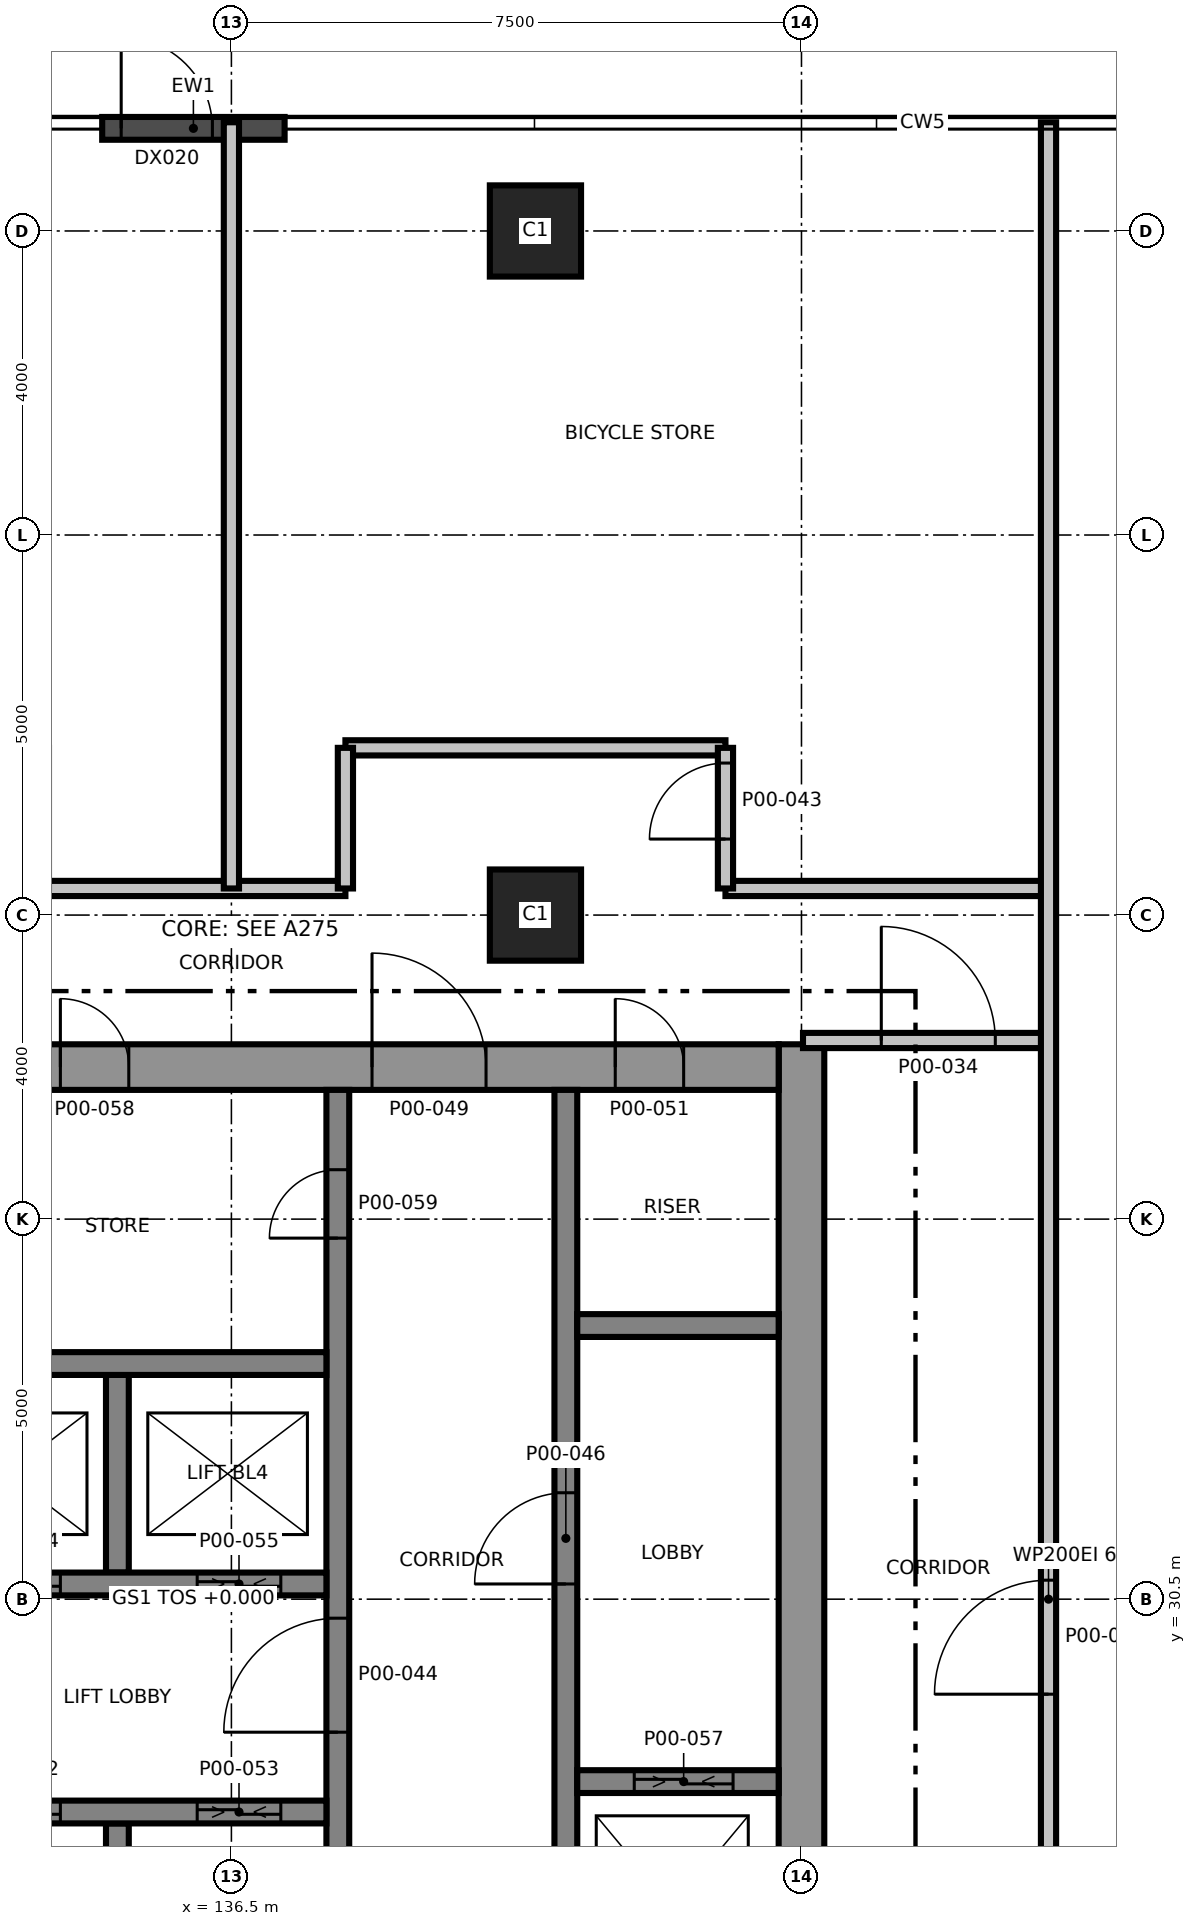
"""IFC4 building model, lengths in metres.
Left out: names, types, materials, properties, quantities, classifications, styles, units other than length and angle.
Written with IfcOpenShell. Run it as: python <this file> out.ifc"""

import sys

from ifc_helpers import new_model, si_unit, direction, frame, frame_2d, origin, origin_2d, place, context, subcontext, project, spatial, rectangle, extrude, element, fill, save


model = new_model("IFC4")
c1 = context("Model", 3, precision=1e-05, world=origin(), true_north=direction((0.0, 1.0)))
c2 = subcontext(c1, "Body", "Model", "MODEL_VIEW")
j1 = project(units=[si_unit("LENGTHUNIT", "METRE"), si_unit("PLANEANGLEUNIT", "RADIAN")], contexts=[c1])
p1 = place(None, origin())
s1 = spatial("IfcSite", under=j1, at=p1, CompositionType="ELEMENT")
p2 = place(p1, origin())
s2 = spatial("IfcBuilding", under=s1, at=p2, CompositionType="ELEMENT")
p3 = place(p2, origin())
s3 = spatial("IfcBuildingStorey", under=s2, at=p3, CompositionType="ELEMENT", Elevation=0.0)
p4 = place(p3, frame((144.0, 24.2, 0.0), z_axis=(0.0, 0.0, 1.0), x_axis=(0.0, 1.0, 0.0)))
e1 = element("IfcWall", 1, at=p4, inside=s3, PredefinedType="SHEAR", context=c2, shape_type="SweptSolid", body=[
    extrude(rectangle(XDim=13.6, YDim=0.6, at=frame_2d((6.8, 0.0))), origin(), (0.0, 0.0, 1.0), 8.0),
])
p5 = place(p3, frame((128.7, 37.5, 0.0), z_axis=(0.0, 0.0, 1.0), x_axis=(1.0, 0.0, 0.0)))
e2 = element("IfcWall", 2, at=p5, inside=s3, PredefinedType="SHEAR", context=c2, shape_type="SweptSolid", body=[
    extrude(rectangle(XDim=15.0, YDim=0.6, at=frame_2d((7.5, 0.0))), origin(), (0.0, 0.0, 1.0), 8.0),
])
p6 = place(p5, frame((9.65, 0.0, 0.0)))
e3 = element("IfcOpeningElement", 3, at=p6, cuts=e2, PredefinedType="OPENING", context=c2, shape_type="SweptSolid", body=[
    extrude(rectangle(XDim=1.5, YDim=2.1, at=frame_2d((0.75, 1.05))), frame((0.0, 0.31, 0.0), z_axis=(0.0, -1.0, 0.0), x_axis=(1.0, 0.0, 0.0)), (0.0, 0.0, 1.0), 0.62),
])
p7 = place(p5, frame((12.85, 0.0, 0.0)))
e4 = element("IfcOpeningElement", 4, at=p7, cuts=e2, PredefinedType="OPENING", context=c2, shape_type="SweptSolid", body=[
    extrude(rectangle(XDim=0.9, YDim=2.1, at=frame_2d((0.45, 1.05))), frame((0.0, 0.31, 0.0), z_axis=(0.0, -1.0, 0.0), x_axis=(1.0, 0.0, 0.0)), (0.0, 0.0, 1.0), 0.62),
])
p8 = place(p5, frame((5.55, 0.0, 0.0)))
e5 = element("IfcOpeningElement", 5, at=p8, cuts=e2, PredefinedType="OPENING", context=c2, shape_type="SweptSolid", body=[
    extrude(rectangle(XDim=0.9, YDim=2.1, at=frame_2d((0.45, 1.05))), frame((0.0, 0.31, 0.0), z_axis=(0.0, -1.0, 0.0), x_axis=(1.0, 0.0, 0.0)), (0.0, 0.0, 1.0), 0.62),
])
p9 = place(p3, frame((137.9, 24.8, 0.0), z_axis=(0.0, 0.0, 1.0), x_axis=(0.0, 1.0, 0.0)))
e6 = element("IfcWall", 6, at=p9, inside=s3, PredefinedType="SHEAR", context=c2, shape_type="SweptSolid", body=[
    extrude(rectangle(XDim=12.4, YDim=0.3, at=frame_2d((6.2, 0.0))), origin(), (0.0, 0.0, 1.0), 8.0),
])
p10 = place(p9, frame((3.95, 0.0, 0.0)))
e7 = element("IfcOpeningElement", 7, at=p10, cuts=e6, PredefinedType="OPENING", context=c2, shape_type="SweptSolid", body=[
    extrude(rectangle(XDim=1.5, YDim=2.1, at=frame_2d((0.75, 1.05))), frame((0.0, 0.16, 0.0), z_axis=(0.0, -1.0, 0.0), x_axis=(1.0, 0.0, 0.0)), (0.0, 0.0, 1.0), 0.32),
])
p11 = place(p9, frame((10.45, 0.0, 0.0)))
e8 = element("IfcOpeningElement", 8, at=p11, cuts=e6, PredefinedType="OPENING", context=c2, shape_type="SweptSolid", body=[
    extrude(rectangle(XDim=0.9, YDim=2.1, at=frame_2d((0.45, 1.05))), frame((0.0, 0.16, 0.0), z_axis=(0.0, -1.0, 0.0), x_axis=(1.0, 0.0, 0.0)), (0.0, 0.0, 1.0), 0.32),
])
p12 = place(p3, frame((140.9, 24.8, 0.0), z_axis=(0.0, 0.0, 1.0), x_axis=(0.0, 1.0, 0.0)))
e9 = element("IfcWall", 9, at=p12, inside=s3, PredefinedType="SHEAR", context=c2, shape_type="SweptSolid", body=[
    extrude(rectangle(XDim=12.4, YDim=0.3, at=frame_2d((6.2, 0.0))), origin(), (0.0, 0.0, 1.0), 8.0),
])
p13 = place(p12, frame((5.9, 0.0, 0.0)))
e10 = element("IfcOpeningElement", 10, at=p13, cuts=e9, PredefinedType="OPENING", context=c2, shape_type="SweptSolid", body=[
    extrude(rectangle(XDim=1.2, YDim=2.1, at=frame_2d((0.6, 1.05))), frame((0.0, 0.16, 0.0), z_axis=(0.0, -1.0, 0.0), x_axis=(1.0, 0.0, 0.0)), (0.0, 0.0, 1.0), 0.32),
])
p14 = place(p3, frame((135.0, 24.8, 0.0), z_axis=(0.0, 0.0, 1.0), x_axis=(0.0, 1.0, 0.0)))
e11 = element("IfcWall", 11, at=p14, inside=s3, PredefinedType="SHEAR", context=c2, shape_type="SweptSolid", body=[
    extrude(rectangle(XDim=2.75, YDim=0.3, at=frame_2d((1.375, 0.0))), origin(), (0.0, 0.0, 1.0), 8.0),
])
p15 = place(p3, frame((135.0, 30.85, 0.0), z_axis=(0.0, 0.0, 1.0), x_axis=(0.0, 1.0, 0.0)))
e12 = element("IfcWall", 12, at=p15, inside=s3, PredefinedType="SHEAR", context=c2, shape_type="SweptSolid", body=[
    extrude(rectangle(XDim=2.6, YDim=0.3, at=frame_2d((1.3, 0.0))), origin(), (0.0, 0.0, 1.0), 8.0),
])
p16 = place(p3, frame((132.25, 27.7, 0.0), z_axis=(0.0, 0.0, 1.0), x_axis=(1.0, 0.0, 0.0)))
e13 = element("IfcWall", 13, at=p16, inside=s3, PredefinedType="SHEAR", context=c2, shape_type="SweptSolid", body=[
    extrude(rectangle(XDim=5.5, YDim=0.3, at=frame_2d((2.75, 0.0))), origin(), (0.0, 0.0, 1.0), 8.0),
])
p17 = place(p16, frame((0.9, 0.0, 0.0)))
e14 = element("IfcOpeningElement", 14, at=p17, cuts=e13, PredefinedType="OPENING", context=c2, shape_type="SweptSolid", body=[
    extrude(rectangle(XDim=1.1, YDim=2.4, at=frame_2d((0.55, 1.2))), frame((0.0, 0.16, 0.0), z_axis=(0.0, -1.0, 0.0), x_axis=(1.0, 0.0, 0.0)), (0.0, 0.0, 1.0), 0.32),
])
p18 = place(p16, frame((3.8, 0.0, 0.0)))
e15 = element("IfcOpeningElement", 15, at=p18, cuts=e13, PredefinedType="OPENING", context=c2, shape_type="SweptSolid", body=[
    extrude(rectangle(XDim=1.1, YDim=2.4, at=frame_2d((0.55, 1.2))), frame((0.0, 0.16, 0.0), z_axis=(0.0, -1.0, 0.0), x_axis=(1.0, 0.0, 0.0)), (0.0, 0.0, 1.0), 0.32),
])
p19 = place(p3, frame((132.25, 30.7, 0.0), z_axis=(0.0, 0.0, 1.0), x_axis=(1.0, 0.0, 0.0)))
e16 = element("IfcWall", 16, at=p19, inside=s3, PredefinedType="SHEAR", context=c2, shape_type="SweptSolid", body=[
    extrude(rectangle(XDim=5.5, YDim=0.3, at=frame_2d((2.75, 0.0))), origin(), (0.0, 0.0, 1.0), 8.0),
])
p20 = place(p19, frame((0.9, 0.0, 0.0)))
e17 = element("IfcOpeningElement", 17, at=p20, cuts=e16, PredefinedType="OPENING", context=c2, shape_type="SweptSolid", body=[
    extrude(rectangle(XDim=1.1, YDim=2.4, at=frame_2d((0.55, 1.2))), frame((0.0, 0.16, 0.0), z_axis=(0.0, -1.0, 0.0), x_axis=(1.0, 0.0, 0.0)), (0.0, 0.0, 1.0), 0.32),
])
p21 = place(p19, frame((3.8, 0.0, 0.0)))
e18 = element("IfcOpeningElement", 18, at=p21, cuts=e16, PredefinedType="OPENING", context=c2, shape_type="SweptSolid", body=[
    extrude(rectangle(XDim=1.1, YDim=2.4, at=frame_2d((0.55, 1.2))), frame((0.0, 0.16, 0.0), z_axis=(0.0, -1.0, 0.0), x_axis=(1.0, 0.0, 0.0)), (0.0, 0.0, 1.0), 0.32),
])
p22 = place(p3, frame((132.25, 33.6, 0.0), z_axis=(0.0, 0.0, 1.0), x_axis=(1.0, 0.0, 0.0)))
e19 = element("IfcWall", 19, at=p22, inside=s3, PredefinedType="SHEAR", context=c2, shape_type="SweptSolid", body=[
    extrude(rectangle(XDim=5.5, YDim=0.3, at=frame_2d((2.75, 0.0))), origin(), (0.0, 0.0, 1.0), 8.0),
])
p23 = place(p3, frame((141.05, 28.1, 0.0), z_axis=(0.0, 0.0, 1.0), x_axis=(1.0, 0.0, 0.0)))
e20 = element("IfcWall", 20, at=p23, inside=s3, PredefinedType="SHEAR", context=c2, shape_type="SweptSolid", body=[
    extrude(rectangle(XDim=2.65, YDim=0.3, at=frame_2d((1.325, 0.0))), origin(), (0.0, 0.0, 1.0), 8.0),
])
p24 = place(p23, frame((0.75, 0.0, 0.0)))
e21 = element("IfcOpeningElement", 21, at=p24, cuts=e20, PredefinedType="OPENING", context=c2, shape_type="SweptSolid", body=[
    extrude(rectangle(XDim=1.3, YDim=2.4, at=frame_2d((0.65, 1.2))), frame((0.0, 0.16, 0.0), z_axis=(0.0, -1.0, 0.0), x_axis=(1.0, 0.0, 0.0)), (0.0, 0.0, 1.0), 0.32),
])
p25 = place(p3, frame((141.05, 34.1, 0.0), z_axis=(0.0, 0.0, 1.0), x_axis=(1.0, 0.0, 0.0)))
e22 = element("IfcWall", 22, at=p25, inside=s3, PredefinedType="SHEAR", context=c2, shape_type="SweptSolid", body=[
    extrude(rectangle(XDim=2.65, YDim=0.3, at=frame_2d((1.325, 0.0))), origin(), (0.0, 0.0, 1.0), 8.0),
])
for number, where, z_axis, x_axis in (
    (23, (140.5, 39.5, 0.0), (0.0, 0.0, 1.0), (1.0, 0.0, 0.0)),
    (24, (140.5, 48.5, 0.0), (0.0, 0.0, 1.0), (1.0, 0.0, 0.0)),
):
    element("IfcColumn", number, at=place(p3, frame(where, z_axis=z_axis, x_axis=x_axis)), inside=s3, PredefinedType="COLUMN", context=c2, shape_type="SweptSolid", body=[
        extrude(rectangle(XDim=1.2, YDim=1.2, at=origin_2d()), origin(), (0.0, 0.0, 1.0), 8.0),
    ])
p26 = place(p3, frame((134.8, 49.85, 0.0), z_axis=(0.0, 0.0, 1.0), x_axis=(1.0, 0.0, 0.0)))
e25 = element("IfcWall", 25, at=p26, inside=s3, PredefinedType="SOLIDWALL", context=c2, shape_type="SweptSolid", body=[
    extrude(rectangle(XDim=2.4, YDim=0.3, at=frame_2d((1.2, 0.0))), origin(), (0.0, 0.0, 1.0), 7.7),
])
p27 = place(p26, frame((0.25, 0.0, 0.0)))
e26 = element("IfcOpeningElement", 26, at=p27, cuts=e25, PredefinedType="OPENING", context=c2, shape_type="SweptSolid", body=[
    extrude(rectangle(XDim=1.2, YDim=2.4, at=frame_2d((0.6, 1.2))), frame((0.0, 0.16, 0.0), z_axis=(0.0, -1.0, 0.0), x_axis=(1.0, 0.0, 0.0)), (0.0, 0.0, 1.0), 0.32),
])
p28 = place(p3, frame((144.02, 37.85, 0.0), z_axis=(0.0, 0.0, 1.0), x_axis=(1.0, 0.0, 0.0)))
e27 = element("IfcWall", 27, at=p28, inside=s3, PredefinedType="PARTITIONING", context=c2, shape_type="SweptSolid", body=[
    extrude(rectangle(XDim=3.23, YDim=0.2, at=frame_2d((1.615, 0.0))), origin(), (0.0, 0.0, 1.0), 7.7),
])
p29 = place(p28, frame((1.03, 0.0, 0.0)))
e28 = element("IfcOpeningElement", 28, at=p29, cuts=e27, PredefinedType="OPENING", context=c2, shape_type="SweptSolid", body=[
    extrude(rectangle(XDim=1.5, YDim=2.1, at=frame_2d((0.75, 1.05))), frame((0.0, 0.11, 0.0), z_axis=(0.0, -1.0, 0.0), x_axis=(1.0, 0.0, 0.0)), (0.0, 0.0, 1.0), 0.22),
])
p30 = place(p3, frame((134.0, 39.85, 0.0), z_axis=(0.0, 0.0, 1.0), x_axis=(1.0, 0.0, 0.0)))
e29 = element("IfcWall", 29, at=p30, inside=s3, PredefinedType="PARTITIONING", context=c2, shape_type="SweptSolid", body=[
    extrude(rectangle(XDim=4.0, YDim=0.2, at=frame_2d((2.0, 0.0))), origin(), (0.0, 0.0, 1.0), 7.7),
])
p31 = place(p3, frame((143.0, 39.85, 0.0), z_axis=(0.0, 0.0, 1.0), x_axis=(1.0, 0.0, 0.0)))
e30 = element("IfcWall", 30, at=p31, inside=s3, PredefinedType="PARTITIONING", context=c2, shape_type="SweptSolid", body=[
    extrude(rectangle(XDim=4.25, YDim=0.2, at=frame_2d((2.125, 0.0))), origin(), (0.0, 0.0, 1.0), 7.7),
])
p32 = place(p3, frame((138.0, 41.7, 0.0), z_axis=(0.0, 0.0, 1.0), x_axis=(1.0, 0.0, 0.0)))
e31 = element("IfcWall", 31, at=p32, inside=s3, PredefinedType="PARTITIONING", context=c2, shape_type="SweptSolid", body=[
    extrude(rectangle(XDim=5.0, YDim=0.2, at=frame_2d((2.5, 0.0))), origin(), (0.0, 0.0, 1.0), 7.7),
])
p33 = place(p3, frame((136.5, 39.85, 0.0), z_axis=(0.0, 0.0, 1.0), x_axis=(0.0, 1.0, 0.0)))
e32 = element("IfcWall", 32, at=p33, inside=s3, PredefinedType="PARTITIONING", context=c2, shape_type="SweptSolid", body=[
    extrude(rectangle(XDim=10.08, YDim=0.2, at=frame_2d((5.04, 0.0))), origin(), (0.0, 0.0, 1.0), 6.8),
])
p34 = place(p3, frame((138.0, 39.85, 0.0), z_axis=(0.0, 0.0, 1.0), x_axis=(0.0, 1.0, 0.0)))
e33 = element("IfcWall", 33, at=p34, inside=s3, PredefinedType="PARTITIONING", context=c2, shape_type="SweptSolid", body=[
    extrude(rectangle(XDim=1.85, YDim=0.2, at=frame_2d((0.925, 0.0))), origin(), (0.0, 0.0, 1.0), 7.7),
])
p35 = place(p3, frame((143.0, 39.85, 0.0), z_axis=(0.0, 0.0, 1.0), x_axis=(0.0, 1.0, 0.0)))
e34 = element("IfcWall", 34, at=p35, inside=s3, PredefinedType="PARTITIONING", context=c2, shape_type="SweptSolid", body=[
    extrude(rectangle(XDim=1.85, YDim=0.2, at=frame_2d((0.925, 0.0))), origin(), (0.0, 0.0, 1.0), 7.7),
])
p36 = place(p35, frame((0.65, 0.0, 0.0)))
e35 = element("IfcOpeningElement", 35, at=p36, cuts=e34, PredefinedType="OPENING", context=c2, shape_type="SweptSolid", body=[
    extrude(rectangle(XDim=1.0, YDim=2.1, at=frame_2d((0.5, 1.05))), frame((0.0, 0.11, 0.0), z_axis=(0.0, -1.0, 0.0), x_axis=(1.0, 0.0, 0.0)), (0.0, 0.0, 1.0), 0.22),
])
p37 = place(p3, frame((147.25, 11.07, 0.0), z_axis=(0.0, 0.0, 1.0), x_axis=(0.0, 1.0, 0.0)))
e36 = element("IfcWall", 36, at=p37, inside=s3, PredefinedType="PARTITIONING", context=c2, shape_type="SweptSolid", body=[
    extrude(rectangle(XDim=38.86, YDim=0.2, at=frame_2d((19.43, 0.0))), origin(), (0.0, 0.0, 1.0), 6.8),
])
p38 = place(p37, frame((18.18, 0.0, 0.0)))
e37 = element("IfcOpeningElement", 37, at=p38, cuts=e36, PredefinedType="OPENING", context=c2, shape_type="SweptSolid", body=[
    extrude(rectangle(XDim=1.5, YDim=2.1, at=frame_2d((0.75, 1.05))), frame((0.0, 0.11, 0.0), z_axis=(0.0, -1.0, 0.0), x_axis=(1.0, 0.0, 0.0)), (0.0, 0.0, 1.0), 0.22),
])
p39 = place(p37, frame((5.03, 0.0, 0.0)))
e38 = element("IfcOpeningElement", 38, at=p39, cuts=e36, PredefinedType="OPENING", context=c2, shape_type="SweptSolid", body=[
    extrude(rectangle(XDim=1.0, YDim=2.1, at=frame_2d((0.5, 1.05))), frame((0.0, 0.11, 0.0), z_axis=(0.0, -1.0, 0.0), x_axis=(1.0, 0.0, 0.0)), (0.0, 0.0, 1.0), 0.22),
])
p40 = place(p27, origin())
e39 = element("IfcDoor", 39, at=p40, inside=s3, OperationType="SINGLE_SWING_LEFT", PredefinedType="DOOR", context=c2, shape_type="SweptSolid", body=[
    extrude(rectangle(XDim=1.2, YDim=2.4, at=frame_2d((0.6, 1.2))), frame((0.0, 0.025, 0.0), z_axis=(0.0, -1.0, 0.0), x_axis=(1.0, 0.0, 0.0)), (0.0, 0.0, 1.0), 0.05),
])
fill(e26, e39)
p41 = place(p29, origin())
e40 = element("IfcDoor", 40, at=p41, inside=s3, OperationType="SINGLE_SWING_RIGHT", PredefinedType="DOOR", context=c2, shape_type="SweptSolid", body=[
    extrude(rectangle(XDim=1.5, YDim=2.1, at=frame_2d((0.75, 1.05))), frame((0.0, 0.025, 0.0), z_axis=(0.0, -1.0, 0.0), x_axis=(1.0, 0.0, 0.0)), (0.0, 0.0, 1.0), 0.05),
])
fill(e28, e40)
p42 = place(p38, origin())
e41 = element("IfcDoor", 41, at=p42, inside=s3, OperationType="SINGLE_SWING_LEFT", PredefinedType="DOOR", context=c2, shape_type="SweptSolid", body=[
    extrude(rectangle(XDim=1.5, YDim=2.1, at=frame_2d((0.75, 1.05))), frame((0.0, 0.025, 0.0), z_axis=(0.0, -1.0, 0.0), x_axis=(1.0, 0.0, 0.0)), (0.0, 0.0, 1.0), 0.05),
])
fill(e37, e41)
p43 = place(p36, origin())
e42 = element("IfcDoor", 42, at=p43, inside=s3, OperationType="SINGLE_SWING_LEFT", PredefinedType="DOOR", context=c2, shape_type="SweptSolid", body=[
    extrude(rectangle(XDim=1.0, YDim=2.1, at=frame_2d((0.5, 1.05))), frame((0.0, 0.025, 0.0), z_axis=(0.0, -1.0, 0.0), x_axis=(1.0, 0.0, 0.0)), (0.0, 0.0, 1.0), 0.05),
])
fill(e35, e42)
p44 = place(p10, origin())
e43 = element("IfcDoor", 43, at=p44, inside=s3, OperationType="SINGLE_SWING_RIGHT", PredefinedType="DOOR", context=c2, shape_type="SweptSolid", body=[
    extrude(rectangle(XDim=1.5, YDim=2.1, at=frame_2d((0.75, 1.05))), frame((0.0, 0.025, 0.0), z_axis=(0.0, -1.0, 0.0), x_axis=(1.0, 0.0, 0.0)), (0.0, 0.0, 1.0), 0.05),
])
fill(e7, e43)
p45 = place(p13, origin())
e44 = element("IfcDoor", 44, at=p45, inside=s3, OperationType="SINGLE_SWING_RIGHT", PredefinedType="DOOR", context=c2, shape_type="SweptSolid", body=[
    extrude(rectangle(XDim=1.2, YDim=2.1, at=frame_2d((0.6, 1.05))), frame((0.0, 0.025, 0.0), z_axis=(0.0, -1.0, 0.0), x_axis=(1.0, 0.0, 0.0)), (0.0, 0.0, 1.0), 0.05),
])
fill(e10, e44)
p46 = place(p6, origin())
e45 = element("IfcDoor", 45, at=p46, inside=s3, OperationType="SINGLE_SWING_RIGHT", PredefinedType="DOOR", context=c2, shape_type="SweptSolid", body=[
    extrude(rectangle(XDim=1.5, YDim=2.1, at=frame_2d((0.75, 1.05))), frame((0.0, 0.025, 0.0), z_axis=(0.0, -1.0, 0.0), x_axis=(1.0, 0.0, 0.0)), (0.0, 0.0, 1.0), 0.05),
])
fill(e3, e45)
p47 = place(p7, origin())
e46 = element("IfcDoor", 46, at=p47, inside=s3, OperationType="SINGLE_SWING_RIGHT", PredefinedType="DOOR", context=c2, shape_type="SweptSolid", body=[
    extrude(rectangle(XDim=0.9, YDim=2.1, at=frame_2d((0.45, 1.05))), frame((0.0, 0.025, 0.0), z_axis=(0.0, -1.0, 0.0), x_axis=(1.0, 0.0, 0.0)), (0.0, 0.0, 1.0), 0.05),
])
fill(e4, e46)
p48 = place(p17, origin())
e47 = element("IfcDoor", 47, at=p48, inside=s3, OperationType="SLIDING_TO_LEFT", PredefinedType="DOOR", context=c2, shape_type="SweptSolid", body=[
    extrude(rectangle(XDim=1.1, YDim=2.4, at=frame_2d((0.55, 1.2))), frame((0.0, 0.025, 0.0), z_axis=(0.0, -1.0, 0.0), x_axis=(1.0, 0.0, 0.0)), (0.0, 0.0, 1.0), 0.05),
])
fill(e14, e47)
p49 = place(p18, origin())
e48 = element("IfcDoor", 48, at=p49, inside=s3, OperationType="SLIDING_TO_LEFT", PredefinedType="DOOR", context=c2, shape_type="SweptSolid", body=[
    extrude(rectangle(XDim=1.1, YDim=2.4, at=frame_2d((0.55, 1.2))), frame((0.0, 0.025, 0.0), z_axis=(0.0, -1.0, 0.0), x_axis=(1.0, 0.0, 0.0)), (0.0, 0.0, 1.0), 0.05),
])
fill(e15, e48)
p50 = place(p20, origin())
e49 = element("IfcDoor", 49, at=p50, inside=s3, OperationType="SLIDING_TO_LEFT", PredefinedType="DOOR", context=c2, shape_type="SweptSolid", body=[
    extrude(rectangle(XDim=1.1, YDim=2.4, at=frame_2d((0.55, 1.2))), frame((0.0, 0.025, 0.0), z_axis=(0.0, -1.0, 0.0), x_axis=(1.0, 0.0, 0.0)), (0.0, 0.0, 1.0), 0.05),
])
fill(e17, e49)
p51 = place(p21, origin())
e50 = element("IfcDoor", 50, at=p51, inside=s3, OperationType="SLIDING_TO_LEFT", PredefinedType="DOOR", context=c2, shape_type="SweptSolid", body=[
    extrude(rectangle(XDim=1.1, YDim=2.4, at=frame_2d((0.55, 1.2))), frame((0.0, 0.025, 0.0), z_axis=(0.0, -1.0, 0.0), x_axis=(1.0, 0.0, 0.0)), (0.0, 0.0, 1.0), 0.05),
])
fill(e18, e50)
p52 = place(p24, origin())
e51 = element("IfcDoor", 51, at=p52, inside=s3, OperationType="SLIDING_TO_LEFT", PredefinedType="DOOR", context=c2, shape_type="SweptSolid", body=[
    extrude(rectangle(XDim=1.3, YDim=2.4, at=frame_2d((0.65, 1.2))), frame((0.0, 0.025, 0.0), z_axis=(0.0, -1.0, 0.0), x_axis=(1.0, 0.0, 0.0)), (0.0, 0.0, 1.0), 0.05),
])
fill(e21, e51)
p53 = place(p8, origin())
e52 = element("IfcDoor", 52, at=p53, inside=s3, OperationType="SINGLE_SWING_LEFT", PredefinedType="DOOR", context=c2, shape_type="SweptSolid", body=[
    extrude(rectangle(XDim=0.9, YDim=2.1, at=frame_2d((0.45, 1.05))), frame((0.0, 0.025, 0.0), z_axis=(0.0, -1.0, 0.0), x_axis=(1.0, 0.0, 0.0)), (0.0, 0.0, 1.0), 0.05),
])
fill(e5, e52)
p54 = place(p11, origin())
e53 = element("IfcDoor", 53, at=p54, inside=s3, OperationType="SINGLE_SWING_RIGHT", PredefinedType="DOOR", context=c2, shape_type="SweptSolid", body=[
    extrude(rectangle(XDim=0.9, YDim=2.1, at=frame_2d((0.45, 1.05))), frame((0.0, 0.025, 0.0), z_axis=(0.0, -1.0, 0.0), x_axis=(1.0, 0.0, 0.0)), (0.0, 0.0, 1.0), 0.05),
])
fill(e8, e53)
save(model, sys.argv[1])
